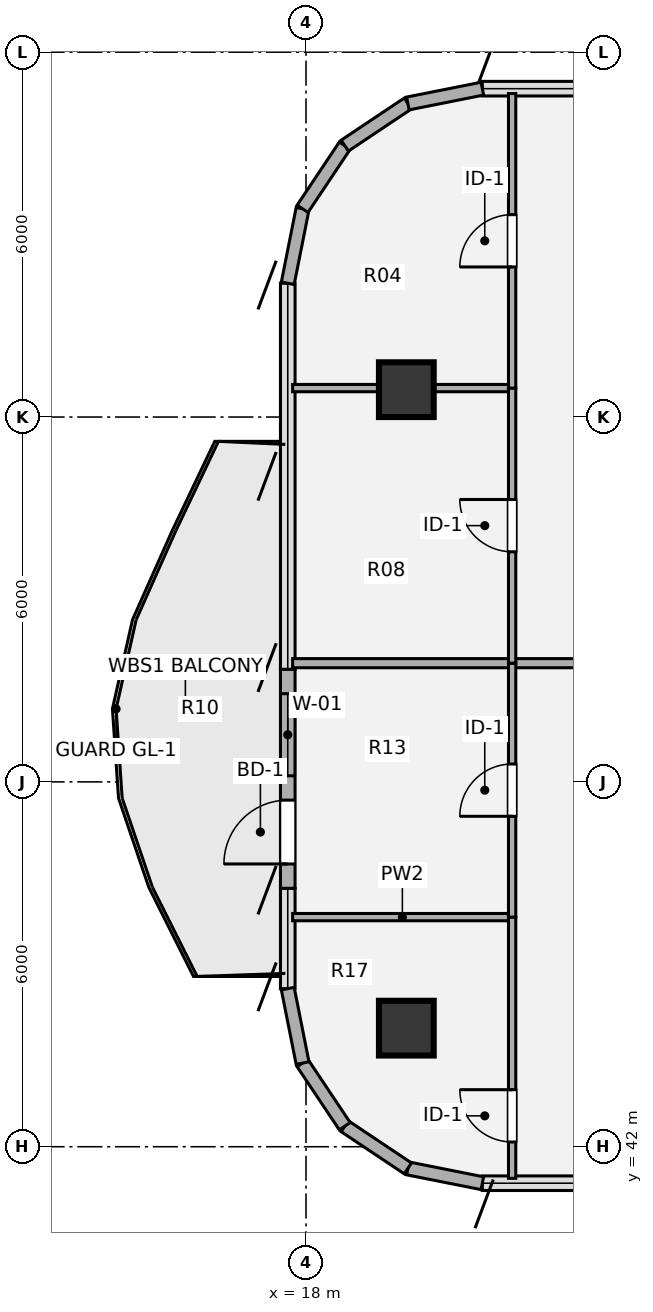
"""IFC4 building model, lengths in metres.
Left out: names, types, materials, properties, quantities, classifications, styles, units other than length and angle.
Written with IfcOpenShell. Run it as: python <this file> out.ifc"""

import sys

from ifc_helpers import new_model, si_unit, direction, frame, frame_2d, origin, origin_2d, place, context, subcontext, project, spatial, rectangle, hollow_circle, extrude, source, transform, mapped, element, fill, save


model = new_model("IFC4")
c1 = context("Model", 3, precision=1e-05, world=origin(), true_north=direction((0.0, 1.0)))
c2 = subcontext(c1, "Body", "Model", "MODEL_VIEW")
j1 = project(units=[si_unit("LENGTHUNIT", "METRE"), si_unit("PLANEANGLEUNIT", "RADIAN")], contexts=[c1])
p1 = place(None, origin())
s1 = spatial("IfcSite", under=j1, at=p1, CompositionType="ELEMENT")
p2 = place(p1, origin())
s2 = spatial("IfcBuilding", under=s1, at=p2, CompositionType="ELEMENT")
p3 = place(p2, frame((0.0, 0.0, 226.8)))
s3 = spatial("IfcBuildingStorey", under=s2, at=p3, CompositionType="ELEMENT", Elevation=226.8)
m1 = source(origin(), c2, "Body", "SweptSolid", [
    extrude(hollow_circle(Radius=0.45, WallThickness=0.032, at=origin_2d()), origin(), (0.0, 0.0, 1.0), 3.78),
])
for number, where, z_axis, x_axis in (
    (1, (19.65, 43.95, 0.0), (0.0, 0.0, 1.0), (1.0, 0.0, 0.0)),
    (2, (19.65, 54.45, 0.0), (0.0, 0.0, 1.0), (1.0, 0.0, 0.0)),
):
    element("IfcColumn", number, at=place(p3, frame(where, z_axis=z_axis, x_axis=x_axis)), inside=s3, PredefinedType="COLUMN", context=c2, shape_type="MappedRepresentation", body=[
        mapped(m1, transform((0.0, 0.0, 0.0), x_axis=(1.0, 0.0, 0.0), y_axis=(0.0, 1.0, 0.0), z_axis=(0.0, 0.0, 1.0), scale=1.0)),
    ])
for number, where, z_axis, x_axis in (
    (3, (20.9, 41.4, 0.0), (0.0, 0.0, 1.0), (-0.981, 0.195, 0.0)),
    (4, (19.675, 41.644, 0.0), (0.0, 0.0, 1.0), (-0.831, 0.556, 0.0)),
    (5, (18.637, 42.337, 0.0), (0.0, 0.0, 1.0), (-0.556, 0.831, 0.0)),
    (6, (17.944, 43.375, 0.0), (0.0, 0.0, 1.0), (-0.195, 0.981, 0.0)),
):
    element("IfcWall", number, at=place(p3, frame(where, z_axis=z_axis, x_axis=x_axis)), inside=s3, PredefinedType="SOLIDWALL", context=c2, shape_type="SweptSolid", body=[
        extrude(rectangle(XDim=1.249, YDim=0.215, at=frame_2d((0.624, 0.0))), origin(), (0.0, 0.0, 1.0), 3.53),
    ])
p4 = place(p3, frame((17.7, 46.25, 0.0), z_axis=(0.0, 0.0, 1.0), x_axis=(0.0, 1.0, 0.0)))
e7 = element("IfcWall", 7, at=p4, inside=s3, PredefinedType="SOLIDWALL", context=c2, shape_type="SweptSolid", body=[
    extrude(rectangle(XDim=3.6, YDim=0.24, at=frame_2d((1.8, 0.0))), origin(), (0.0, 0.0, 1.0), 3.53),
])
p5 = place(p4, frame((0.4, 0.0, 0.0)))
e8 = element("IfcOpeningElement", 8, at=p5, cuts=e7, PredefinedType="OPENING", context=c2, shape_type="SweptSolid", body=[
    extrude(rectangle(XDim=1.05, YDim=2.15, at=origin_2d()), frame((0.525, 0.13, 1.075), z_axis=(0.0, -1.0, 0.0), x_axis=(1.0, 0.0, 0.0)), (0.0, 0.0, 1.0), 0.26),
])
p6 = place(p4, frame((1.85, 0.0, 0.85)))
e9 = element("IfcOpeningElement", 9, at=p6, cuts=e7, PredefinedType="OPENING", context=c2, shape_type="SweptSolid", body=[
    extrude(rectangle(XDim=1.35, YDim=1.35, at=origin_2d()), frame((0.675, 0.13, 0.675), z_axis=(0.0, -1.0, 0.0), x_axis=(1.0, 0.0, 0.0)), (0.0, 0.0, 1.0), 0.26),
])
for number, where, z_axis, x_axis in (
    (10, (17.7, 56.2, 0.0), (0.0, 0.0, 1.0), (0.195, 0.981, 0.0)),
    (11, (17.944, 57.425, 0.0), (0.0, 0.0, 1.0), (0.556, 0.831, 0.0)),
    (12, (18.637, 58.463, 0.0), (0.0, 0.0, 1.0), (0.831, 0.556, 0.0)),
    (13, (19.675, 59.156, 0.0), (0.0, 0.0, 1.0), (0.981, 0.195, 0.0)),
):
    element("IfcWall", number, at=place(p3, frame(where, z_axis=z_axis, x_axis=x_axis)), inside=s3, PredefinedType="SOLIDWALL", context=c2, shape_type="SweptSolid", body=[
        extrude(rectangle(XDim=1.249, YDim=0.215, at=frame_2d((0.624, 0.0))), origin(), (0.0, 0.0, 1.0), 3.53),
    ])
p7 = place(p3, frame((17.78, 45.776, 0.0), z_axis=(0.0, 0.0, 1.0), x_axis=(1.0, 0.0, 0.0)))
e14 = element("IfcWall", 14, at=p7, inside=s3, PredefinedType="PARTITIONING", context=c2, shape_type="SweptSolid", body=[
    extrude(rectangle(XDim=3.61, YDim=0.12, at=frame_2d((1.805, 0.0))), origin(), (0.0, 0.0, 1.0), 2.982),
])
p8 = place(p3, frame((17.78, 49.952, 0.0), z_axis=(0.0, 0.0, 1.0), x_axis=(1.0, 0.0, 0.0)))
e15 = element("IfcWall", 15, at=p8, inside=s3, PredefinedType="PARTITIONING", context=c2, shape_type="SweptSolid", body=[
    extrude(rectangle(XDim=15.77, YDim=0.15, at=frame_2d((7.885, 0.0))), origin(), (0.0, 0.0, 1.0), 2.982),
])
p9 = place(p3, frame((17.78, 54.476, 0.0), z_axis=(0.0, 0.0, 1.0), x_axis=(1.0, 0.0, 0.0)))
e16 = element("IfcWall", 16, at=p9, inside=s3, PredefinedType="PARTITIONING", context=c2, shape_type="SweptSolid", body=[
    extrude(rectangle(XDim=3.61, YDim=0.12, at=frame_2d((1.805, 0.0))), origin(), (0.0, 0.0, 1.0), 2.903),
])
p10 = place(p3, frame((21.39, 41.48, 0.0), z_axis=(0.0, 0.0, 1.0), x_axis=(0.0, 1.0, 0.0)))
e17 = element("IfcWall", 17, at=p10, inside=s3, PredefinedType="PARTITIONING", context=c2, shape_type="SweptSolid", body=[
    extrude(rectangle(XDim=4.296, YDim=0.12, at=frame_2d((2.148, 0.0))), origin(), (0.0, 0.0, 1.0), 3.5),
])
p11 = place(p10, frame((0.598, 0.0, 0.0)))
e18 = element("IfcOpeningElement", 18, at=p11, cuts=e17, PredefinedType="OPENING", context=c2, shape_type="SweptSolid", body=[
    extrude(rectangle(XDim=0.86, YDim=2.1, at=origin_2d()), frame((0.43, 0.07, 1.05), z_axis=(0.0, -1.0, 0.0), x_axis=(1.0, 0.0, 0.0)), (0.0, 0.0, 1.0), 0.14),
])
p12 = place(p3, frame((21.39, 45.776, 0.0), z_axis=(0.0, 0.0, 1.0), x_axis=(0.0, 1.0, 0.0)))
e19 = element("IfcWall", 19, at=p12, inside=s3, PredefinedType="PARTITIONING", context=c2, shape_type="SweptSolid", body=[
    extrude(rectangle(XDim=4.176, YDim=0.12, at=frame_2d((2.088, 0.0))), origin(), (0.0, 0.0, 1.0), 3.5),
])
p13 = place(p12, frame((1.658, 0.0, 0.0)))
e20 = element("IfcOpeningElement", 20, at=p13, cuts=e19, PredefinedType="OPENING", context=c2, shape_type="SweptSolid", body=[
    extrude(rectangle(XDim=0.86, YDim=2.1, at=origin_2d()), frame((0.43, 0.07, 1.05), z_axis=(0.0, -1.0, 0.0), x_axis=(1.0, 0.0, 0.0)), (0.0, 0.0, 1.0), 0.14),
])
p14 = place(p3, frame((21.39, 49.952, 0.0), z_axis=(0.0, 0.0, 1.0), x_axis=(0.0, 1.0, 0.0)))
e21 = element("IfcWall", 21, at=p14, inside=s3, PredefinedType="PARTITIONING", context=c2, shape_type="SweptSolid", body=[
    extrude(rectangle(XDim=4.524, YDim=0.12, at=frame_2d((2.262, 0.0))), origin(), (0.0, 0.0, 1.0), 3.5),
])
p15 = place(p14, frame((1.832, 0.0, 0.0)))
e22 = element("IfcOpeningElement", 22, at=p15, cuts=e21, PredefinedType="OPENING", context=c2, shape_type="SweptSolid", body=[
    extrude(rectangle(XDim=0.86, YDim=2.1, at=origin_2d()), frame((0.43, 0.07, 1.05), z_axis=(0.0, -1.0, 0.0), x_axis=(1.0, 0.0, 0.0)), (0.0, 0.0, 1.0), 0.14),
])
p16 = place(p3, frame((21.39, 54.476, 0.0), z_axis=(0.0, 0.0, 1.0), x_axis=(0.0, 1.0, 0.0)))
e23 = element("IfcWall", 23, at=p16, inside=s3, PredefinedType="PARTITIONING", context=c2, shape_type="SweptSolid", body=[
    extrude(rectangle(XDim=4.844, YDim=0.12, at=frame_2d((2.422, 0.0))), origin(), (0.0, 0.0, 1.0), 3.5),
])
p17 = place(p16, frame((1.992, 0.0, 0.0)))
e24 = element("IfcOpeningElement", 24, at=p17, cuts=e23, PredefinedType="OPENING", context=c2, shape_type="SweptSolid", body=[
    extrude(rectangle(XDim=0.86, YDim=2.1, at=origin_2d()), frame((0.43, 0.07, 1.05), z_axis=(0.0, -1.0, 0.0), x_axis=(1.0, 0.0, 0.0)), (0.0, 0.0, 1.0), 0.14),
])
m2 = source(origin(), c2, "Body", "SweptSolid", [
    extrude(rectangle(XDim=1.05, YDim=2.15, at=origin_2d()), frame((0.525, 0.025, 1.075), z_axis=(0.0, -1.0, 0.0), x_axis=(1.0, 0.0, 0.0)), (0.0, 0.0, 1.0), 0.05),
])
p18 = place(p5, origin())
e25 = element("IfcDoor", 25, at=p18, inside=s3, OperationType="SINGLE_SWING_LEFT", PredefinedType="DOOR", context=c2, shape_type="MappedRepresentation", body=[
    mapped(m2, transform((0.0, 0.0, 0.0), x_axis=(1.0, 0.0, 0.0), y_axis=(0.0, 1.0, 0.0), z_axis=(0.0, 0.0, 1.0), scale=1.0)),
])
fill(e8, e25)
m3 = source(origin(), c2, "Body", "SweptSolid", [
    extrude(rectangle(XDim=1.35, YDim=1.35, at=origin_2d()), frame((0.675, 0.03, 0.675), z_axis=(0.0, -1.0, 0.0), x_axis=(1.0, 0.0, 0.0)), (0.0, 0.0, 1.0), 0.06),
])
p19 = place(p6, origin())
e26 = element("IfcWindow", 26, at=p19, inside=s3, PartitioningType="SINGLE_PANEL", PredefinedType="WINDOW", context=c2, shape_type="MappedRepresentation", body=[
    mapped(m3, transform((0.0, 0.0, 0.0), x_axis=(1.0, 0.0, 0.0), y_axis=(0.0, 1.0, 0.0), z_axis=(0.0, 0.0, 1.0), scale=1.0)),
])
fill(e9, e26)
m4 = source(origin(), c2, "Body", "SweptSolid", [
    extrude(rectangle(XDim=0.86, YDim=2.1, at=origin_2d()), frame((0.43, 0.025, 1.05), z_axis=(0.0, -1.0, 0.0), x_axis=(1.0, 0.0, 0.0)), (0.0, 0.0, 1.0), 0.05),
])
p20 = place(p11, origin())
e27 = element("IfcDoor", 27, at=p20, inside=s3, OperationType="SINGLE_SWING_RIGHT", PredefinedType="DOOR", context=c2, shape_type="MappedRepresentation", body=[
    mapped(m4, transform((0.0, 0.0, 0.0), x_axis=(1.0, 0.0, 0.0), y_axis=(0.0, 1.0, 0.0), z_axis=(0.0, 0.0, 1.0), scale=1.0)),
])
fill(e18, e27)
p21 = place(p13, origin())
e28 = element("IfcDoor", 28, at=p21, inside=s3, OperationType="SINGLE_SWING_LEFT", PredefinedType="DOOR", context=c2, shape_type="MappedRepresentation", body=[
    mapped(m4, transform((0.0, 0.0, 0.0), x_axis=(1.0, 0.0, 0.0), y_axis=(0.0, 1.0, 0.0), z_axis=(0.0, 0.0, 1.0), scale=1.0)),
])
fill(e20, e28)
p22 = place(p15, origin())
e29 = element("IfcDoor", 29, at=p22, inside=s3, OperationType="SINGLE_SWING_RIGHT", PredefinedType="DOOR", context=c2, shape_type="MappedRepresentation", body=[
    mapped(m4, transform((0.0, 0.0, 0.0), x_axis=(1.0, 0.0, 0.0), y_axis=(0.0, 1.0, 0.0), z_axis=(0.0, 0.0, 1.0), scale=1.0)),
])
fill(e22, e29)
p23 = place(p17, origin())
e30 = element("IfcDoor", 30, at=p23, inside=s3, OperationType="SINGLE_SWING_LEFT", PredefinedType="DOOR", context=c2, shape_type="MappedRepresentation", body=[
    mapped(m4, transform((0.0, 0.0, 0.0), x_axis=(1.0, 0.0, 0.0), y_axis=(0.0, 1.0, 0.0), z_axis=(0.0, 0.0, 1.0), scale=1.0)),
])
fill(e24, e30)
save(model, sys.argv[1])
